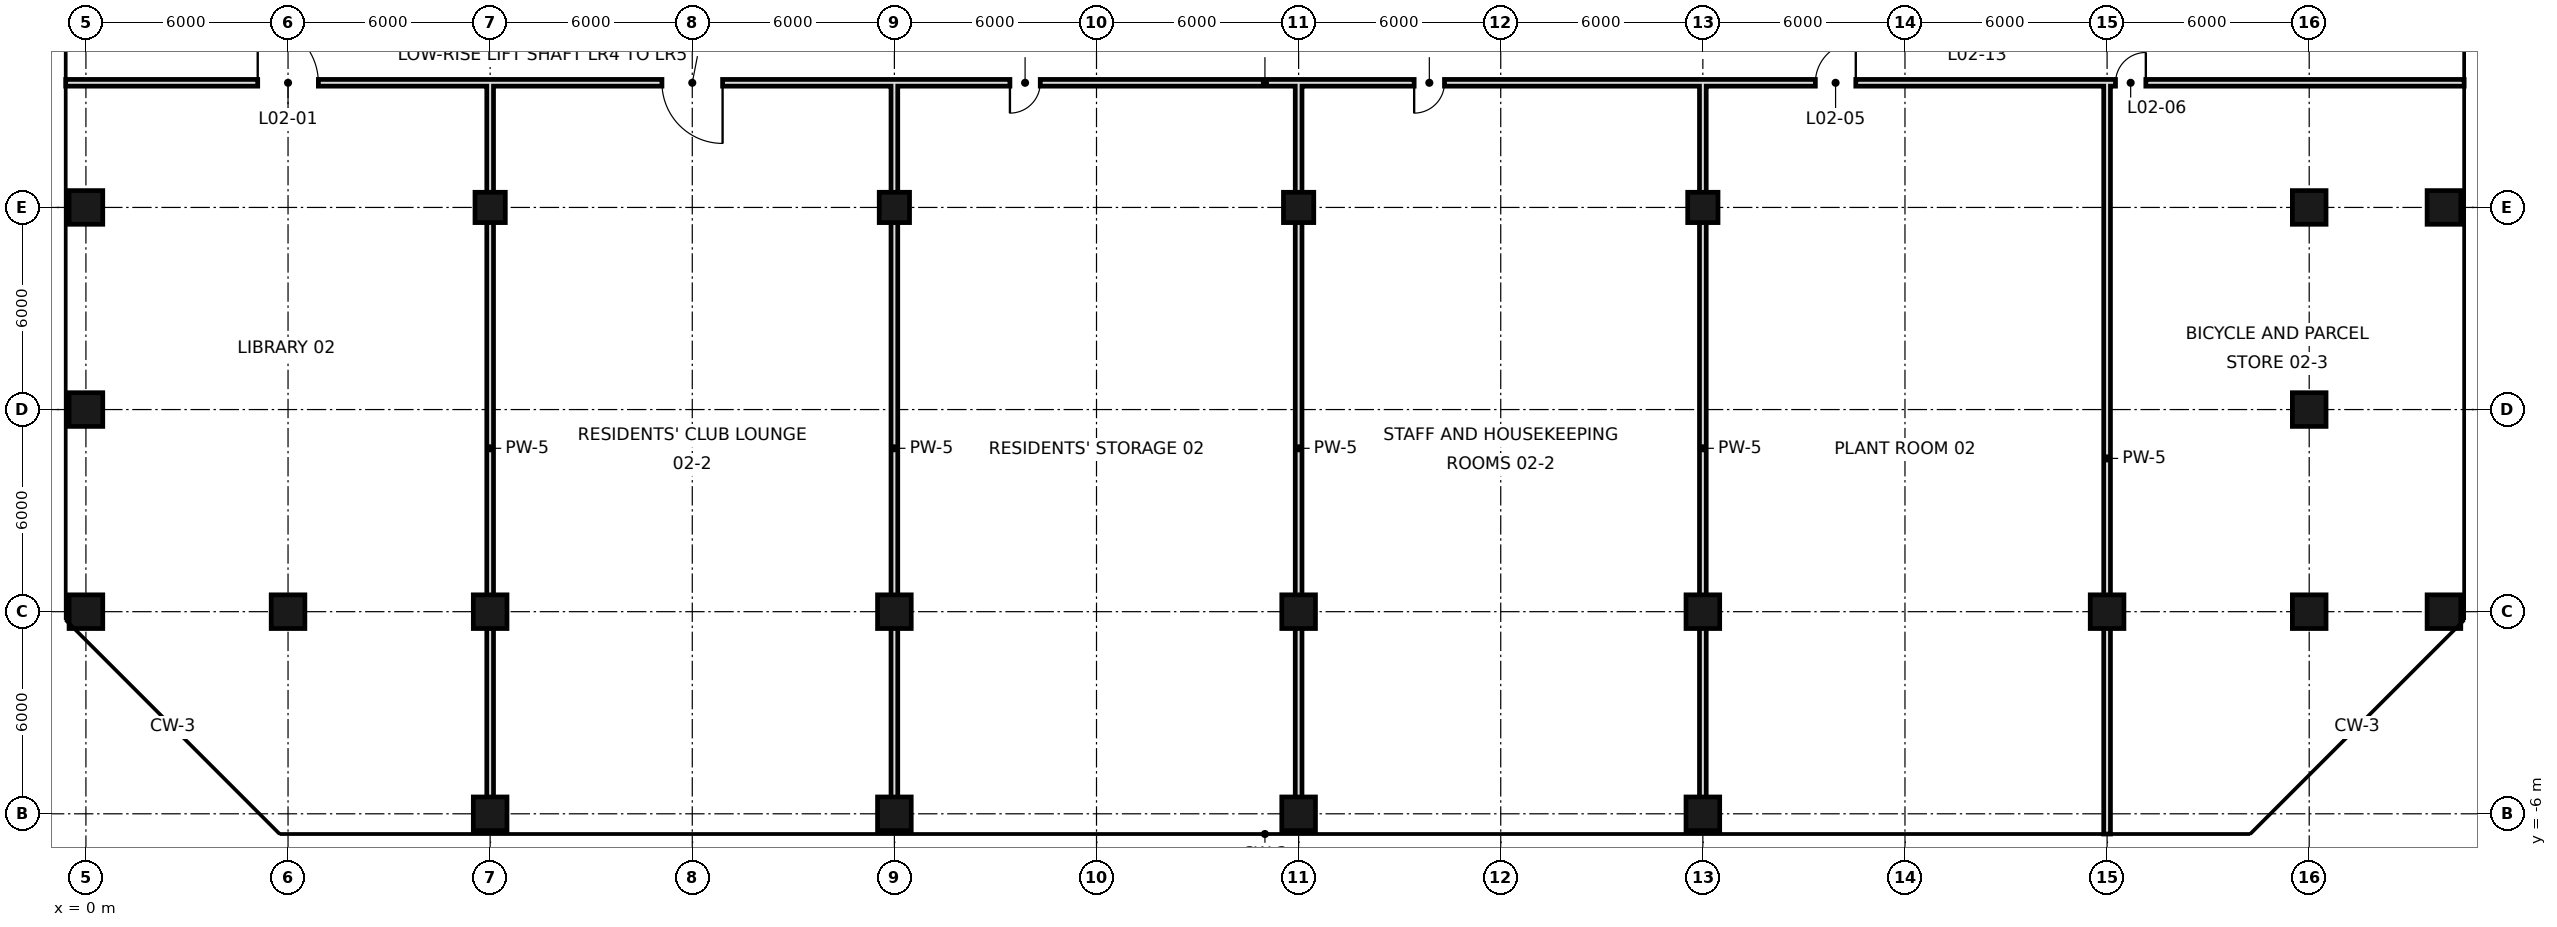
"""IFC4 building model, lengths in metres.
Left out: names, types, materials, properties, quantities, classifications, styles, units other than length and angle.
Written with IfcOpenShell. Run it as: python <this file> out.ifc"""

import sys

from ifc_helpers import new_model, si_unit, direction, frame, frame_2d, origin, origin_with_axes, origin_2d, place, context, subcontext, project, spatial, rectangle, hollow_rectangle, extrude, element, fill, save


model = new_model("IFC4")
c1 = context("Model", 3, precision=1e-05, world=origin(), true_north=direction((0.0, 1.0)))
c2 = subcontext(c1, "Body", "Model", "MODEL_VIEW")
j1 = project(units=[si_unit("LENGTHUNIT", "METRE"), si_unit("PLANEANGLEUNIT", "RADIAN")], contexts=[c1])
p1 = place(None, origin())
s1 = spatial("IfcSite", under=j1, at=p1, CompositionType="ELEMENT")
p2 = place(p1, origin())
s2 = spatial("IfcBuilding", under=s1, at=p2, CompositionType="ELEMENT")
p3 = place(p2, frame((0.0, 0.0, 20.4)))
s3 = spatial("IfcBuildingStorey", under=s2, at=p3, CompositionType="ELEMENT", Elevation=20.4)
p4 = place(p3, origin_with_axes())
e1 = element("IfcColumn", 1, at=p4, inside=s3, PredefinedType="COLUMN", context=c2, shape_type="SweptSolid", body=[
    extrude(hollow_rectangle(XDim=1.0, YDim=1.0, WallThickness=0.05, at=origin_2d()), origin(), (0.0, 0.0, 1.0), 4.8),
])
p5 = place(p3, frame((0.0, 6.0, -0.4), z_axis=(0.0, 0.0, 1.0), x_axis=(1.0, 0.0, 0.0)))
e2 = element("IfcColumn", 2, at=p5, inside=s3, PredefinedType="COLUMN", context=c2, shape_type="SweptSolid", body=[
    extrude(hollow_rectangle(XDim=1.0, YDim=1.0, WallThickness=0.05, at=origin_2d()), origin(), (0.0, 0.0, 1.0), 5.2),
])
p6 = place(p3, frame((0.0, 12.0, 0.0), z_axis=(0.0, 0.0, 1.0), x_axis=(1.0, 0.0, 0.0)))
e3 = element("IfcColumn", 3, at=p6, inside=s3, PredefinedType="COLUMN", context=c2, shape_type="SweptSolid", body=[
    extrude(hollow_rectangle(XDim=1.0, YDim=1.0, WallThickness=0.05, at=origin_2d()), origin(), (0.0, 0.0, 1.0), 4.8),
])
for number, where, z_axis, x_axis in (
    (4, (6.0, 0.0, -0.4), (0.0, 0.0, 1.0), (1.0, 0.0, 0.0)),
    (5, (12.0, -6.0, -0.4), (0.0, 0.0, 1.0), (1.0, 0.0, 0.0)),
):
    element("IfcColumn", number, at=place(p3, frame(where, z_axis=z_axis, x_axis=x_axis)), inside=s3, PredefinedType="COLUMN", context=c2, shape_type="SweptSolid", body=[
        extrude(hollow_rectangle(XDim=1.0, YDim=1.0, WallThickness=0.05, at=origin_2d()), origin(), (0.0, 0.0, 1.0), 5.2),
    ])
p7 = place(p3, frame((12.0, 0.0, 0.0), z_axis=(0.0, 0.0, 1.0), x_axis=(1.0, 0.0, 0.0)))
e6 = element("IfcColumn", 6, at=p7, inside=s3, PredefinedType="COLUMN", context=c2, shape_type="SweptSolid", body=[
    extrude(hollow_rectangle(XDim=1.0, YDim=1.0, WallThickness=0.05, at=origin_2d()), origin(), (0.0, 0.0, 1.0), 4.8),
])
p8 = place(p3, frame((12.0, 12.0, 0.0), z_axis=(0.0, 0.0, 1.0), x_axis=(1.0, 0.0, 0.0)))
e7 = element("IfcColumn", 7, at=p8, inside=s3, PredefinedType="COLUMN", context=c2, shape_type="SweptSolid", body=[
    extrude(hollow_rectangle(XDim=0.9, YDim=0.9, WallThickness=0.045, at=origin_2d()), origin(), (0.0, 0.0, 1.0), 4.8),
])
p9 = place(p3, frame((24.0, -6.0, -0.4), z_axis=(0.0, 0.0, 1.0), x_axis=(1.0, 0.0, 0.0)))
e8 = element("IfcColumn", 8, at=p9, inside=s3, PredefinedType="COLUMN", context=c2, shape_type="SweptSolid", body=[
    extrude(hollow_rectangle(XDim=1.0, YDim=1.0, WallThickness=0.05, at=origin_2d()), origin(), (0.0, 0.0, 1.0), 5.2),
])
p10 = place(p3, frame((24.0, 0.0, 0.0), z_axis=(0.0, 0.0, 1.0), x_axis=(1.0, 0.0, 0.0)))
e9 = element("IfcColumn", 9, at=p10, inside=s3, PredefinedType="COLUMN", context=c2, shape_type="SweptSolid", body=[
    extrude(hollow_rectangle(XDim=1.0, YDim=1.0, WallThickness=0.05, at=origin_2d()), origin(), (0.0, 0.0, 1.0), 4.8),
])
p11 = place(p3, frame((24.0, 12.0, 0.0), z_axis=(0.0, 0.0, 1.0), x_axis=(1.0, 0.0, 0.0)))
e10 = element("IfcColumn", 10, at=p11, inside=s3, PredefinedType="COLUMN", context=c2, shape_type="SweptSolid", body=[
    extrude(hollow_rectangle(XDim=0.9, YDim=0.9, WallThickness=0.045, at=origin_2d()), origin(), (0.0, 0.0, 1.0), 4.8),
])
p12 = place(p3, frame((36.0, -6.0, -0.4), z_axis=(0.0, 0.0, 1.0), x_axis=(1.0, 0.0, 0.0)))
e11 = element("IfcColumn", 11, at=p12, inside=s3, PredefinedType="COLUMN", context=c2, shape_type="SweptSolid", body=[
    extrude(hollow_rectangle(XDim=1.0, YDim=1.0, WallThickness=0.05, at=origin_2d()), origin(), (0.0, 0.0, 1.0), 5.2),
])
p13 = place(p3, frame((36.0, 0.0, 0.0), z_axis=(0.0, 0.0, 1.0), x_axis=(1.0, 0.0, 0.0)))
e12 = element("IfcColumn", 12, at=p13, inside=s3, PredefinedType="COLUMN", context=c2, shape_type="SweptSolid", body=[
    extrude(hollow_rectangle(XDim=1.0, YDim=1.0, WallThickness=0.05, at=origin_2d()), origin(), (0.0, 0.0, 1.0), 4.8),
])
p14 = place(p3, frame((36.0, 12.0, 0.0), z_axis=(0.0, 0.0, 1.0), x_axis=(1.0, 0.0, 0.0)))
e13 = element("IfcColumn", 13, at=p14, inside=s3, PredefinedType="COLUMN", context=c2, shape_type="SweptSolid", body=[
    extrude(hollow_rectangle(XDim=0.9, YDim=0.9, WallThickness=0.045, at=origin_2d()), origin(), (0.0, 0.0, 1.0), 4.8),
])
p15 = place(p3, frame((48.0, -6.0, -0.4), z_axis=(0.0, 0.0, 1.0), x_axis=(1.0, 0.0, 0.0)))
e14 = element("IfcColumn", 14, at=p15, inside=s3, PredefinedType="COLUMN", context=c2, shape_type="SweptSolid", body=[
    extrude(hollow_rectangle(XDim=1.0, YDim=1.0, WallThickness=0.05, at=origin_2d()), origin(), (0.0, 0.0, 1.0), 5.2),
])
p16 = place(p3, frame((48.0, 0.0, 0.0), z_axis=(0.0, 0.0, 1.0), x_axis=(1.0, 0.0, 0.0)))
e15 = element("IfcColumn", 15, at=p16, inside=s3, PredefinedType="COLUMN", context=c2, shape_type="SweptSolid", body=[
    extrude(hollow_rectangle(XDim=1.0, YDim=1.0, WallThickness=0.05, at=origin_2d()), origin(), (0.0, 0.0, 1.0), 4.8),
])
p17 = place(p3, frame((48.0, 12.0, 0.0), z_axis=(0.0, 0.0, 1.0), x_axis=(1.0, 0.0, 0.0)))
e16 = element("IfcColumn", 16, at=p17, inside=s3, PredefinedType="COLUMN", context=c2, shape_type="SweptSolid", body=[
    extrude(hollow_rectangle(XDim=0.9, YDim=0.9, WallThickness=0.045, at=origin_2d()), origin(), (0.0, 0.0, 1.0), 4.8),
])
p18 = place(p3, frame((60.0, 0.0, -0.4), z_axis=(0.0, 0.0, 1.0), x_axis=(1.0, 0.0, 0.0)))
e17 = element("IfcColumn", 17, at=p18, inside=s3, PredefinedType="COLUMN", context=c2, shape_type="SweptSolid", body=[
    extrude(hollow_rectangle(XDim=1.0, YDim=1.0, WallThickness=0.05, at=origin_2d()), origin(), (0.0, 0.0, 1.0), 5.2),
])
p19 = place(p3, frame((66.0, 0.0, 0.0), z_axis=(0.0, 0.0, 1.0), x_axis=(1.0, 0.0, 0.0)))
e18 = element("IfcColumn", 18, at=p19, inside=s3, PredefinedType="COLUMN", context=c2, shape_type="SweptSolid", body=[
    extrude(hollow_rectangle(XDim=1.0, YDim=1.0, WallThickness=0.05, at=origin_2d()), origin(), (0.0, 0.0, 1.0), 4.8),
])
p20 = place(p3, frame((66.0, 6.0, -0.4), z_axis=(0.0, 0.0, 1.0), x_axis=(1.0, 0.0, 0.0)))
e19 = element("IfcColumn", 19, at=p20, inside=s3, PredefinedType="COLUMN", context=c2, shape_type="SweptSolid", body=[
    extrude(hollow_rectangle(XDim=1.0, YDim=1.0, WallThickness=0.05, at=origin_2d()), origin(), (0.0, 0.0, 1.0), 5.2),
])
p21 = place(p3, frame((66.0, 12.0, 0.0), z_axis=(0.0, 0.0, 1.0), x_axis=(1.0, 0.0, 0.0)))
e20 = element("IfcColumn", 20, at=p21, inside=s3, PredefinedType="COLUMN", context=c2, shape_type="SweptSolid", body=[
    extrude(hollow_rectangle(XDim=1.0, YDim=1.0, WallThickness=0.05, at=origin_2d()), origin(), (0.0, 0.0, 1.0), 4.8),
])
for number, where, z_axis, x_axis in (
    (21, (70.0, 0.0, -0.4), (0.0, 0.0, 1.0), (1.0, 0.0, 0.0)),
    (22, (70.0, 12.0, -0.4), (0.0, 0.0, 1.0), (1.0, 0.0, 0.0)),
):
    element("IfcColumn", number, at=place(p3, frame(where, z_axis=z_axis, x_axis=x_axis)), inside=s3, PredefinedType="COLUMN", context=c2, shape_type="SweptSolid", body=[
        extrude(hollow_rectangle(XDim=1.0, YDim=1.0, WallThickness=0.05, at=origin_2d()), origin(), (0.0, 0.0, 1.0), 5.2),
    ])
for number, where, z_axis, x_axis in (
    (23, (12.0, -6.0, 0.0), (0.0, 0.0, 1.0), (0.0, 1.0, 0.0)),
    (24, (24.0, -6.0, 0.0), (0.0, 0.0, 1.0), (0.0, 1.0, 0.0)),
    (25, (36.0, -6.0, 0.0), (0.0, 0.0, 1.0), (0.0, 1.0, 0.0)),
    (26, (48.0, -6.0, 0.0), (0.0, 0.0, 1.0), (0.0, 1.0, 0.0)),
):
    element("IfcWall", number, at=place(p3, frame(where, z_axis=z_axis, x_axis=x_axis)), inside=s3, PredefinedType="SOLIDWALL", context=c2, shape_type="SweptSolid", body=[
        extrude(rectangle(XDim=21.7, YDim=0.2, at=frame_2d((10.85, 0.0))), origin(), (0.0, 0.0, 1.0), 3.7),
    ])
p22 = place(p3, frame((60.0, -6.6, 0.0), z_axis=(0.0, 0.0, 1.0), x_axis=(0.0, 1.0, 0.0)))
e27 = element("IfcWall", 27, at=p22, inside=s3, PredefinedType="SOLIDWALL", context=c2, shape_type="SweptSolid", body=[
    extrude(rectangle(XDim=22.3, YDim=0.2, at=frame_2d((11.15, 0.0))), origin(), (0.0, 0.0, 1.0), 3.5),
])
p23 = place(p3, frame((-0.6, 15.7, 0.0), z_axis=(0.0, 0.0, 1.0), x_axis=(1.0, 0.0, 0.0)))
e28 = element("IfcWall", 28, at=p23, inside=s3, PredefinedType="SOLIDWALL", context=c2, shape_type="SweptSolid", body=[
    extrude(rectangle(XDim=71.2, YDim=0.2, at=frame_2d((35.6, 0.0))), origin(), (0.0, 0.0, 1.0), 3.7),
])
p24 = place(p23, frame((5.7, 0.0, 0.0)))
e29 = element("IfcOpeningElement", 29, at=p24, cuts=e28, PredefinedType="OPENING", context=c2, shape_type="SweptSolid", body=[
    extrude(rectangle(XDim=1.8, YDim=2.4, at=frame_2d((0.9, 1.2))), frame((0.0, 0.11, 0.0), z_axis=(0.0, -1.0, 0.0), x_axis=(1.0, 0.0, 0.0)), (0.0, 0.0, 1.0), 0.22),
])
p25 = place(p23, frame((17.7, 0.0, 0.0)))
e30 = element("IfcOpeningElement", 30, at=p25, cuts=e28, PredefinedType="OPENING", context=c2, shape_type="SweptSolid", body=[
    extrude(rectangle(XDim=1.8, YDim=2.4, at=frame_2d((0.9, 1.2))), frame((0.0, 0.11, 0.0), z_axis=(0.0, -1.0, 0.0), x_axis=(1.0, 0.0, 0.0)), (0.0, 0.0, 1.0), 0.22),
])
p26 = place(p23, frame((28.03, 0.0, 0.0)))
e31 = element("IfcOpeningElement", 31, at=p26, cuts=e28, PredefinedType="OPENING", context=c2, shape_type="SweptSolid", body=[
    extrude(rectangle(XDim=0.9, YDim=2.1, at=frame_2d((0.45, 1.05))), frame((0.0, 0.11, 0.0), z_axis=(0.0, -1.0, 0.0), x_axis=(1.0, 0.0, 0.0)), (0.0, 0.0, 1.0), 0.22),
])
p27 = place(p23, frame((40.03, 0.0, 0.0)))
e32 = element("IfcOpeningElement", 32, at=p27, cuts=e28, PredefinedType="OPENING", context=c2, shape_type="SweptSolid", body=[
    extrude(rectangle(XDim=0.9, YDim=2.1, at=frame_2d((0.45, 1.05))), frame((0.0, 0.11, 0.0), z_axis=(0.0, -1.0, 0.0), x_axis=(1.0, 0.0, 0.0)), (0.0, 0.0, 1.0), 0.22),
])
p28 = place(p23, frame((51.94, 0.0, 0.0)))
e33 = element("IfcOpeningElement", 33, at=p28, cuts=e28, PredefinedType="OPENING", context=c2, shape_type="SweptSolid", body=[
    extrude(rectangle(XDim=1.2, YDim=2.4, at=frame_2d((0.6, 1.2))), frame((0.0, 0.11, 0.0), z_axis=(0.0, -1.0, 0.0), x_axis=(1.0, 0.0, 0.0)), (0.0, 0.0, 1.0), 0.22),
])
p29 = place(p23, frame((60.85, 0.0, 0.0)))
e34 = element("IfcOpeningElement", 34, at=p29, cuts=e28, PredefinedType="OPENING", context=c2, shape_type="SweptSolid", body=[
    extrude(rectangle(XDim=0.9, YDim=2.1, at=frame_2d((0.45, 1.05))), frame((0.0, 0.11, 0.0), z_axis=(0.0, -1.0, 0.0), x_axis=(1.0, 0.0, 0.0)), (0.0, 0.0, 1.0), 0.22),
])
p30 = place(p24, origin())
e35 = element("IfcDoor", 35, at=p30, inside=s3, OperationType="SINGLE_SWING_LEFT", PredefinedType="DOOR", context=c2, shape_type="SweptSolid", body=[
    extrude(rectangle(XDim=1.8, YDim=2.4, at=frame_2d((0.9, 1.2))), frame((0.0, 0.025, 0.0), z_axis=(0.0, -1.0, 0.0), x_axis=(1.0, 0.0, 0.0)), (0.0, 0.0, 1.0), 0.05),
])
fill(e29, e35)
p31 = place(p25, origin())
e36 = element("IfcDoor", 36, at=p31, inside=s3, OperationType="SINGLE_SWING_RIGHT", PredefinedType="DOOR", context=c2, shape_type="SweptSolid", body=[
    extrude(rectangle(XDim=1.8, YDim=2.4, at=frame_2d((0.9, 1.2))), frame((0.0, 0.025, 0.0), z_axis=(0.0, -1.0, 0.0), x_axis=(1.0, 0.0, 0.0)), (0.0, 0.0, 1.0), 0.05),
])
fill(e30, e36)
p32 = place(p26, frame((0.9, 0.0, 0.0), z_axis=(0.0, 0.0, 1.0), x_axis=(-1.0, 0.0, 0.0)))
e37 = element("IfcDoor", 37, at=p32, inside=s3, OperationType="SINGLE_SWING_RIGHT", PredefinedType="DOOR", context=c2, shape_type="SweptSolid", body=[
    extrude(rectangle(XDim=0.9, YDim=2.1, at=frame_2d((0.45, 1.05))), frame((0.0, 0.025, 0.0), z_axis=(0.0, -1.0, 0.0), x_axis=(1.0, 0.0, 0.0)), (0.0, 0.0, 1.0), 0.05),
])
fill(e31, e37)
p33 = place(p27, frame((0.9, 0.0, 0.0), z_axis=(0.0, 0.0, 1.0), x_axis=(-1.0, 0.0, 0.0)))
e38 = element("IfcDoor", 38, at=p33, inside=s3, OperationType="SINGLE_SWING_RIGHT", PredefinedType="DOOR", context=c2, shape_type="SweptSolid", body=[
    extrude(rectangle(XDim=0.9, YDim=2.1, at=frame_2d((0.45, 1.05))), frame((0.0, 0.025, 0.0), z_axis=(0.0, -1.0, 0.0), x_axis=(1.0, 0.0, 0.0)), (0.0, 0.0, 1.0), 0.05),
])
fill(e32, e38)
p34 = place(p28, frame((1.2, 0.0, 0.0), z_axis=(0.0, 0.0, 1.0), x_axis=(-1.0, 0.0, 0.0)))
e39 = element("IfcDoor", 39, at=p34, inside=s3, OperationType="SINGLE_SWING_LEFT", PredefinedType="DOOR", context=c2, shape_type="SweptSolid", body=[
    extrude(rectangle(XDim=1.2, YDim=2.4, at=frame_2d((0.6, 1.2))), frame((0.0, 0.025, 0.0), z_axis=(0.0, -1.0, 0.0), x_axis=(1.0, 0.0, 0.0)), (0.0, 0.0, 1.0), 0.05),
])
fill(e33, e39)
p35 = place(p29, frame((0.9, 0.0, 0.0), z_axis=(0.0, 0.0, 1.0), x_axis=(-1.0, 0.0, 0.0)))
e40 = element("IfcDoor", 40, at=p35, inside=s3, OperationType="SINGLE_SWING_LEFT", PredefinedType="DOOR", context=c2, shape_type="SweptSolid", body=[
    extrude(rectangle(XDim=0.9, YDim=2.1, at=frame_2d((0.45, 1.05))), frame((0.0, 0.025, 0.0), z_axis=(0.0, -1.0, 0.0), x_axis=(1.0, 0.0, 0.0)), (0.0, 0.0, 1.0), 0.05),
])
fill(e34, e40)
save(model, sys.argv[1])
